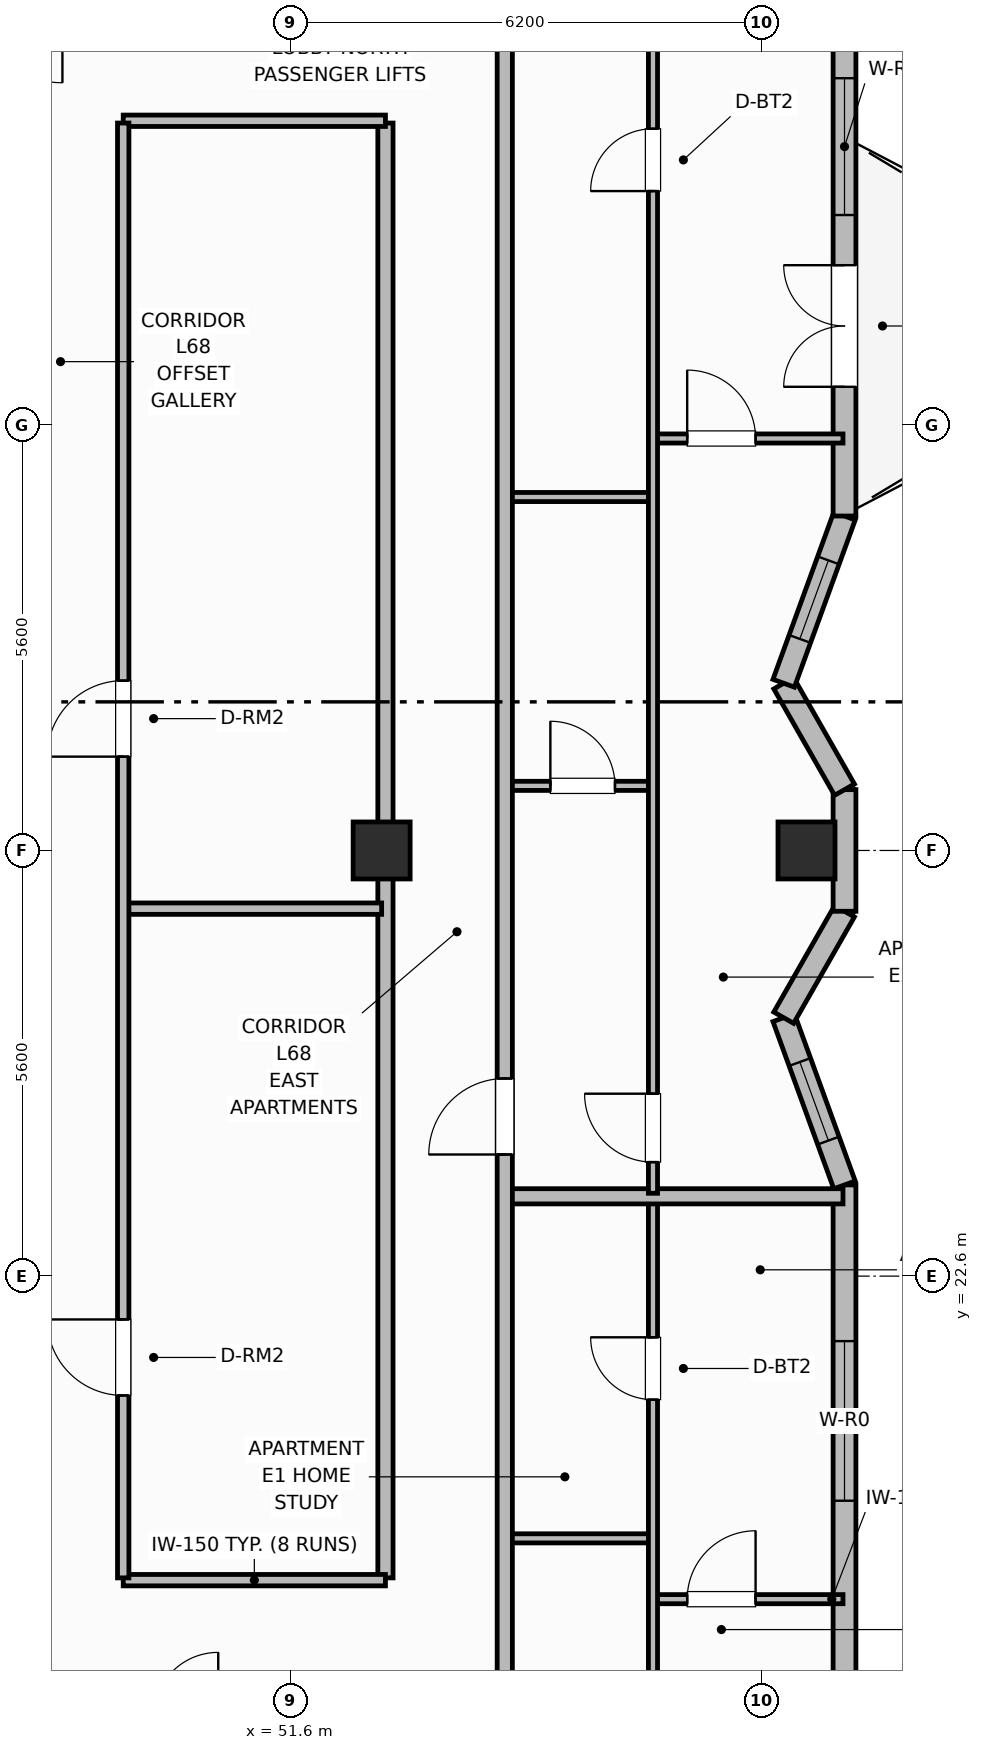
"""IFC4 building model, lengths in metres.
Left out: names, types, materials, properties, quantities, classifications, styles, units other than length and angle.
Written with IfcOpenShell. Run it as: python <this file> out.ifc"""

import sys

from ifc_helpers import new_model, si_unit, direction, frame, frame_2d, origin, origin_2d, place, context, subcontext, project, spatial, rectangle, extrude, element, fill, save


model = new_model("IFC4")
c1 = context("Model", 3, precision=1e-05, world=origin(), true_north=direction((0.0, 1.0)))
c2 = subcontext(c1, "Body", "Model", "MODEL_VIEW")
j1 = project(units=[si_unit("LENGTHUNIT", "METRE"), si_unit("PLANEANGLEUNIT", "RADIAN")], contexts=[c1])
p1 = place(None, origin())
s1 = spatial("IfcSite", under=j1, at=p1, CompositionType="ELEMENT")
p2 = place(p1, origin())
s2 = spatial("IfcBuilding", under=s1, at=p2, CompositionType="ELEMENT")
p3 = place(p2, frame((0.0, 0.0, 271.3)))
s3 = spatial("IfcBuildingStorey", under=s2, at=p3, CompositionType="ELEMENT", Elevation=271.3)
for number, where, z_axis, x_axis in (
    (1, (52.8, 28.2, 0.0), (0.0, 0.0, 1.0), (1.0, 0.0, 0.0)),
    (2, (58.39, 28.2, 0.0), (0.0, 0.0, 1.0), (1.0, 0.0, 0.0)),
):
    element("IfcColumn", number, at=place(p3, frame(where, z_axis=z_axis, x_axis=x_axis)), inside=s3, PredefinedType="COLUMN", context=c2, shape_type="SweptSolid", body=[
        extrude(rectangle(XDim=0.75, YDim=0.75, at=origin_2d()), origin(), (0.0, 0.0, 1.0), 3.7),
    ])
p4 = place(p3, frame((58.89, 12.68, 0.0), z_axis=(0.0, 0.0, 1.0), x_axis=(0.0, 1.0, 0.0)))
e3 = element("IfcWall", 3, at=p4, inside=s3, PredefinedType="SOLIDWALL", context=c2, shape_type="SweptSolid", body=[
    extrude(rectangle(XDim=11.12, YDim=0.3, at=frame_2d((5.56, 0.0))), origin(), (0.0, 0.0, 1.0), 2.73),
])
p5 = place(p4, frame((6.965, 0.0, 0.71)))
e4 = element("IfcOpeningElement", 4, at=p5, cuts=e3, PredefinedType="OPENING", context=c2, shape_type="SweptSolid", body=[
    extrude(rectangle(XDim=2.1, YDim=1.9, at=frame_2d((1.05, 0.95))), frame((0.0, 0.16, 0.0), z_axis=(0.0, -1.0, 0.0), x_axis=(1.0, 0.0, 0.0)), (0.0, 0.0, 1.0), 0.32),
])
p6 = place(p3, frame((58.89, 23.8, 0.0), z_axis=(0.0, 0.0, 1.0), x_axis=(-0.341676068702, 0.939817782379, 0.0)))
e5 = element("IfcWall", 5, at=p6, inside=s3, PredefinedType="SOLIDWALL", context=c2, shape_type="SweptSolid", body=[
    extrude(rectangle(XDim=2.341, YDim=0.3, at=frame_2d((1.17, 0.0))), origin(), (0.0, 0.0, 1.0), 2.73),
])
p7 = place(p6, frame((0.621, 0.0, 0.92)))
e6 = element("IfcOpeningElement", 6, at=p7, cuts=e5, PredefinedType="OPENING", context=c2, shape_type="SweptSolid", body=[
    extrude(rectangle(XDim=1.1, YDim=1.65, at=frame_2d((0.55, 0.825))), frame((0.0, 0.16, 0.0), z_axis=(0.0, -1.0, 0.0), x_axis=(1.0, 0.0, 0.0)), (0.0, 0.0, 1.0), 0.32),
])
p8 = place(p3, frame((58.09, 26.0, 0.0), z_axis=(0.0, 0.0, 1.0), x_axis=(0.496073707015, 0.868280413927, 0.0)))
e7 = element("IfcWall", 7, at=p8, inside=s3, PredefinedType="SOLIDWALL", context=c2, shape_type="SweptSolid", body=[
    extrude(rectangle(XDim=1.612, YDim=0.3, at=frame_2d((0.806, 0.0))), origin(), (0.0, 0.0, 1.0), 2.73),
])
p9 = place(p3, frame((58.89, 27.4, 0.0), z_axis=(0.0, 0.0, 1.0), x_axis=(0.0, 1.0, 0.0)))
e8 = element("IfcWall", 8, at=p9, inside=s3, PredefinedType="SOLIDWALL", context=c2, shape_type="SweptSolid", body=[
    extrude(rectangle(XDim=1.6, YDim=0.3, at=frame_2d((0.8, 0.0))), origin(), (0.0, 0.0, 1.0), 2.73),
])
p10 = place(p3, frame((58.89, 29.0, 0.0), z_axis=(0.0, 0.0, 1.0), x_axis=(-0.496073707015, 0.868280413927, 0.0)))
e9 = element("IfcWall", 9, at=p10, inside=s3, PredefinedType="SOLIDWALL", context=c2, shape_type="SweptSolid", body=[
    extrude(rectangle(XDim=1.612, YDim=0.3, at=frame_2d((0.806, 0.0))), origin(), (0.0, 0.0, 1.0), 2.73),
])
p11 = place(p3, frame((58.09, 30.4, 0.0), z_axis=(0.0, 0.0, 1.0), x_axis=(0.341642580708, 0.939829956453, 0.0)))
e10 = element("IfcWall", 10, at=p11, inside=s3, PredefinedType="SOLIDWALL", context=c2, shape_type="SweptSolid", body=[
    extrude(rectangle(XDim=2.341, YDim=0.3, at=frame_2d((1.17, 0.0))), origin(), (0.0, 0.0, 1.0), 2.73),
])
p12 = place(p11, frame((0.621, 0.0, 0.92)))
e11 = element("IfcOpeningElement", 11, at=p12, cuts=e10, PredefinedType="OPENING", context=c2, shape_type="SweptSolid", body=[
    extrude(rectangle(XDim=1.1, YDim=1.65, at=frame_2d((0.55, 0.825))), frame((0.0, 0.16, 0.0), z_axis=(0.0, -1.0, 0.0), x_axis=(1.0, 0.0, 0.0)), (0.0, 0.0, 1.0), 0.32),
])
p13 = place(p3, frame((58.89, 32.6, 0.0), z_axis=(0.0, 0.0, 1.0), x_axis=(0.0, 1.0, 0.0)))
e12 = element("IfcWall", 12, at=p13, inside=s3, PredefinedType="SOLIDWALL", context=c2, shape_type="SweptSolid", body=[
    extrude(rectangle(XDim=11.12, YDim=0.3, at=frame_2d((5.56, 0.0))), origin(), (0.0, 0.0, 1.0), 2.73),
])
p14 = place(p13, frame((1.7, 0.0, 0.0)))
e13 = element("IfcOpeningElement", 13, at=p14, cuts=e12, PredefinedType="OPENING", context=c2, shape_type="SweptSolid", body=[
    extrude(rectangle(XDim=1.6, YDim=2.1, at=frame_2d((0.8, 1.05))), frame((0.0, 0.16, 0.0), z_axis=(0.0, -1.0, 0.0), x_axis=(1.0, 0.0, 0.0)), (0.0, 0.0, 1.0), 0.32),
])
p15 = place(p13, frame((3.96, 0.0, 0.76)))
e14 = element("IfcOpeningElement", 14, at=p15, cuts=e12, PredefinedType="OPENING", context=c2, shape_type="SweptSolid", body=[
    extrude(rectangle(XDim=1.8, YDim=1.85, at=frame_2d((0.9, 0.925))), frame((0.0, 0.16, 0.0), z_axis=(0.0, -1.0, 0.0), x_axis=(1.0, 0.0, 0.0)), (0.0, 0.0, 1.0), 0.32),
])
p16 = place(p13, frame((8.283, 0.0, 0.76)))
e15 = element("IfcOpeningElement", 15, at=p16, cuts=e12, PredefinedType="OPENING", context=c2, shape_type="SweptSolid", body=[
    extrude(rectangle(XDim=1.8, YDim=1.85, at=frame_2d((0.9, 0.925))), frame((0.0, 0.16, 0.0), z_axis=(0.0, -1.0, 0.0), x_axis=(1.0, 0.0, 0.0)), (0.0, 0.0, 1.0), 0.32),
])
p17 = place(p3, frame((52.85, 18.63, 0.0), z_axis=(0.0, 0.0, 1.0), x_axis=(0.0, 1.0, 0.0)))
e16 = element("IfcWall", 16, at=p17, inside=s3, PredefinedType="PARTITIONING", context=c2, shape_type="SweptSolid", body=[
    extrude(rectangle(XDim=19.14, YDim=0.2, at=frame_2d((9.57, 0.0))), origin(), (0.0, 0.0, 1.0), 2.56),
])
for number, where, z_axis, x_axis in (
    (17, (49.4, 18.6, 0.0), (0.0, 0.0, 1.0), (1.0, 0.0, 0.0)),
    (18, (49.4, 37.8, 0.0), (0.0, 0.0, 1.0), (1.0, 0.0, 0.0)),
):
    element("IfcWall", number, at=place(p3, frame(where, z_axis=z_axis, x_axis=x_axis)), inside=s3, PredefinedType="PARTITIONING", context=c2, shape_type="SweptSolid", body=[
        extrude(rectangle(XDim=3.45, YDim=0.15, at=frame_2d((1.725, 0.0))), origin(), (0.0, 0.0, 1.0), 2.56),
    ])
p18 = place(p3, frame((49.43, 27.434, 0.0), z_axis=(0.0, 0.0, 1.0), x_axis=(1.0, 0.0, 0.0)))
e19 = element("IfcWall", 19, at=p18, inside=s3, PredefinedType="PARTITIONING", context=c2, shape_type="SweptSolid", body=[
    extrude(rectangle(XDim=3.37, YDim=0.15, at=frame_2d((1.685, 0.0))), origin(), (0.0, 0.0, 1.0), 2.56),
])
p19 = place(p3, frame((49.4, 18.63, 0.0), z_axis=(0.0, 0.0, 1.0), x_axis=(0.0, 1.0, 0.0)))
e20 = element("IfcWall", 20, at=p19, inside=s3, PredefinedType="PARTITIONING", context=c2, shape_type="SweptSolid", body=[
    extrude(rectangle(XDim=19.14, YDim=0.15, at=frame_2d((9.57, 0.0))), origin(), (0.0, 0.0, 1.0), 2.56),
])
p20 = place(p19, frame((2.4, 0.0, 0.0)))
e21 = element("IfcOpeningElement", 21, at=p20, cuts=e20, PredefinedType="OPENING", context=c2, shape_type="SweptSolid", body=[
    extrude(rectangle(XDim=1.0, YDim=2.15, at=frame_2d((0.5, 1.075))), frame((0.0, 0.085, 0.0), z_axis=(0.0, -1.0, 0.0), x_axis=(1.0, 0.0, 0.0)), (0.0, 0.0, 1.0), 0.17),
])
p21 = place(p19, frame((10.804, 0.0, 0.0)))
e22 = element("IfcOpeningElement", 22, at=p21, cuts=e20, PredefinedType="OPENING", context=c2, shape_type="SweptSolid", body=[
    extrude(rectangle(XDim=1.0, YDim=2.15, at=frame_2d((0.5, 1.075))), frame((0.0, 0.085, 0.0), z_axis=(0.0, -1.0, 0.0), x_axis=(1.0, 0.0, 0.0)), (0.0, 0.0, 1.0), 0.17),
])
p22 = place(p3, frame((54.42, 19.15, 0.0), z_axis=(0.0, 0.0, 1.0), x_axis=(1.0, 0.0, 0.0)))
e23 = element("IfcWall", 23, at=p22, inside=s3, PredefinedType="PARTITIONING", context=c2, shape_type="SweptSolid", body=[
    extrude(rectangle(XDim=1.95, YDim=0.12, at=frame_2d((0.975, 0.0))), origin(), (0.0, 0.0, 1.0), 2.56),
])
p23 = place(p3, frame((56.37, 18.35, 0.0), z_axis=(0.0, 0.0, 1.0), x_axis=(1.0, 0.0, 0.0)))
e24 = element("IfcWall", 24, at=p23, inside=s3, PredefinedType="PARTITIONING", context=c2, shape_type="SweptSolid", body=[
    extrude(rectangle(XDim=2.5, YDim=0.12, at=frame_2d((1.25, 0.0))), origin(), (0.0, 0.0, 1.0), 2.56),
])
p24 = place(p23, frame((0.45, 0.0, 0.0)))
e25 = element("IfcOpeningElement", 25, at=p24, cuts=e24, PredefinedType="OPENING", context=c2, shape_type="SweptSolid", body=[
    extrude(rectangle(XDim=0.9, YDim=2.1, at=frame_2d((0.45, 1.05))), frame((0.0, 0.07, 0.0), z_axis=(0.0, -1.0, 0.0), x_axis=(1.0, 0.0, 0.0)), (0.0, 0.0, 1.0), 0.14),
])
p25 = place(p3, frame((56.37, 9.99, 0.0), z_axis=(0.0, 0.0, 1.0), x_axis=(0.0, 1.0, 0.0)))
e26 = element("IfcWall", 26, at=p25, inside=s3, PredefinedType="PARTITIONING", context=c2, shape_type="SweptSolid", body=[
    extrude(rectangle(XDim=13.62, YDim=0.12, at=frame_2d((6.81, 0.0))), origin(), (0.0, 0.0, 1.0), 2.56),
])
p26 = place(p25, frame((0.41, 0.0, 0.0)))
e27 = element("IfcOpeningElement", 27, at=p26, cuts=e26, PredefinedType="OPENING", context=c2, shape_type="SweptSolid", body=[
    extrude(rectangle(XDim=0.9, YDim=2.1, at=frame_2d((0.45, 1.05))), frame((0.0, 0.07, 0.0), z_axis=(0.0, -1.0, 0.0), x_axis=(1.0, 0.0, 0.0)), (0.0, 0.0, 1.0), 0.14),
])
p27 = place(p25, frame((10.985, 0.0, 0.0)))
e28 = element("IfcOpeningElement", 28, at=p27, cuts=e26, PredefinedType="OPENING", context=c2, shape_type="SweptSolid", body=[
    extrude(rectangle(XDim=0.82, YDim=2.08, at=frame_2d((0.41, 1.04))), frame((0.0, 0.07, 0.0), z_axis=(0.0, -1.0, 0.0), x_axis=(1.0, 0.0, 0.0)), (0.0, 0.0, 1.0), 0.14),
])
p28 = place(p3, frame((54.42, 23.65, 0.0), z_axis=(0.0, 0.0, 1.0), x_axis=(1.0, 0.0, 0.0)))
e29 = element("IfcWall", 29, at=p28, inside=s3, PredefinedType="PARTITIONING", context=c2, shape_type="SweptSolid", body=[
    extrude(rectangle(XDim=4.45, YDim=0.2, at=frame_2d((2.225, 0.0))), origin(), (0.0, 0.0, 1.0), 2.56),
])
p29 = place(p3, frame((54.42, 29.05, 0.0), z_axis=(0.0, 0.0, 1.0), x_axis=(1.0, 0.0, 0.0)))
e30 = element("IfcWall", 30, at=p29, inside=s3, PredefinedType="PARTITIONING", context=c2, shape_type="SweptSolid", body=[
    extrude(rectangle(XDim=1.95, YDim=0.12, at=frame_2d((0.975, 0.0))), origin(), (0.0, 0.0, 1.0), 2.56),
])
p30 = place(p29, frame((0.6, 0.0, 0.0)))
e31 = element("IfcOpeningElement", 31, at=p30, cuts=e30, PredefinedType="OPENING", context=c2, shape_type="SweptSolid", body=[
    extrude(rectangle(XDim=0.85, YDim=2.1, at=frame_2d((0.425, 1.05))), frame((0.0, 0.07, 0.0), z_axis=(0.0, -1.0, 0.0), x_axis=(1.0, 0.0, 0.0)), (0.0, 0.0, 1.0), 0.14),
])
p31 = place(p3, frame((54.42, 32.85, 0.0), z_axis=(0.0, 0.0, 1.0), x_axis=(1.0, 0.0, 0.0)))
e32 = element("IfcWall", 32, at=p31, inside=s3, PredefinedType="PARTITIONING", context=c2, shape_type="SweptSolid", body=[
    extrude(rectangle(XDim=1.95, YDim=0.12, at=frame_2d((0.975, 0.0))), origin(), (0.0, 0.0, 1.0), 2.56),
])
p32 = place(p3, frame((56.37, 33.62, 0.0), z_axis=(0.0, 0.0, 1.0), x_axis=(1.0, 0.0, 0.0)))
e33 = element("IfcWall", 33, at=p32, inside=s3, PredefinedType="PARTITIONING", context=c2, shape_type="SweptSolid", body=[
    extrude(rectangle(XDim=2.5, YDim=0.12, at=frame_2d((1.25, 0.0))), origin(), (0.0, 0.0, 1.0), 2.56),
])
p33 = place(p32, frame((0.45, 0.0, 0.0)))
e34 = element("IfcOpeningElement", 34, at=p33, cuts=e33, PredefinedType="OPENING", context=c2, shape_type="SweptSolid", body=[
    extrude(rectangle(XDim=0.9, YDim=2.1, at=frame_2d((0.45, 1.05))), frame((0.0, 0.07, 0.0), z_axis=(0.0, -1.0, 0.0), x_axis=(1.0, 0.0, 0.0)), (0.0, 0.0, 1.0), 0.14),
])
p34 = place(p3, frame((56.37, 23.69, 0.0), z_axis=(0.0, 0.0, 1.0), x_axis=(0.0, 1.0, 0.0)))
e35 = element("IfcWall", 35, at=p34, inside=s3, PredefinedType="PARTITIONING", context=c2, shape_type="SweptSolid", body=[
    extrude(rectangle(XDim=22.72, YDim=0.12, at=frame_2d((11.36, 0.0))), origin(), (0.0, 0.0, 1.0), 2.56),
])
p35 = place(p34, frame((0.41, 0.0, 0.0)))
e36 = element("IfcOpeningElement", 36, at=p35, cuts=e35, PredefinedType="OPENING", context=c2, shape_type="SweptSolid", body=[
    extrude(rectangle(XDim=0.9, YDim=2.1, at=frame_2d((0.45, 1.05))), frame((0.0, 0.07, 0.0), z_axis=(0.0, -1.0, 0.0), x_axis=(1.0, 0.0, 0.0)), (0.0, 0.0, 1.0), 0.14),
])
p36 = place(p34, frame((13.185, 0.0, 0.0)))
e37 = element("IfcOpeningElement", 37, at=p36, cuts=e35, PredefinedType="OPENING", context=c2, shape_type="SweptSolid", body=[
    extrude(rectangle(XDim=0.82, YDim=2.08, at=frame_2d((0.41, 1.04))), frame((0.0, 0.07, 0.0), z_axis=(0.0, -1.0, 0.0), x_axis=(1.0, 0.0, 0.0)), (0.0, 0.0, 1.0), 0.14),
])
p37 = place(p3, frame((54.42, 9.95, 0.0), z_axis=(0.0, 0.0, 1.0), x_axis=(0.0, 1.0, 0.0)))
e38 = element("IfcWall", 38, at=p37, inside=s3, PredefinedType="PARTITIONING", context=c2, shape_type="SweptSolid", body=[
    extrude(rectangle(XDim=36.5, YDim=0.2, at=frame_2d((18.25, 0.0))), origin(), (0.0, 0.0, 1.0), 2.56),
])
p38 = place(p37, frame((3.25, 0.0, 0.0)))
e39 = element("IfcOpeningElement", 39, at=p38, cuts=e38, PredefinedType="OPENING", context=c2, shape_type="SweptSolid", body=[
    extrude(rectangle(XDim=1.0, YDim=2.15, at=frame_2d((0.5, 1.075))), frame((0.0, 0.11, 0.0), z_axis=(0.0, -1.0, 0.0), x_axis=(1.0, 0.0, 0.0)), (0.0, 0.0, 1.0), 0.22),
])
p39 = place(p37, frame((14.25, 0.0, 0.0)))
e40 = element("IfcOpeningElement", 40, at=p39, cuts=e38, PredefinedType="OPENING", context=c2, shape_type="SweptSolid", body=[
    extrude(rectangle(XDim=1.0, YDim=2.15, at=frame_2d((0.5, 1.075))), frame((0.0, 0.11, 0.0), z_axis=(0.0, -1.0, 0.0), x_axis=(1.0, 0.0, 0.0)), (0.0, 0.0, 1.0), 0.22),
])
p40 = place(p5, origin())
e41 = element("IfcWindow", 41, at=p40, inside=s3, PartitioningType="SINGLE_PANEL", PredefinedType="WINDOW", context=c2, shape_type="SweptSolid", body=[
    extrude(rectangle(XDim=2.1, YDim=1.9, at=frame_2d((1.05, 0.95))), frame((0.0, 0.03, 0.0), z_axis=(0.0, -1.0, 0.0), x_axis=(1.0, 0.0, 0.0)), (0.0, 0.0, 1.0), 0.06),
])
fill(e4, e41)
p41 = place(p7, origin())
e42 = element("IfcWindow", 42, at=p41, inside=s3, PartitioningType="SINGLE_PANEL", PredefinedType="WINDOW", context=c2, shape_type="SweptSolid", body=[
    extrude(rectangle(XDim=1.1, YDim=1.65, at=frame_2d((0.55, 0.825))), frame((0.0, 0.03, 0.0), z_axis=(0.0, -1.0, 0.0), x_axis=(1.0, 0.0, 0.0)), (0.0, 0.0, 1.0), 0.06),
])
fill(e6, e42)
p42 = place(p12, origin())
e43 = element("IfcWindow", 43, at=p42, inside=s3, PartitioningType="SINGLE_PANEL", PredefinedType="WINDOW", context=c2, shape_type="SweptSolid", body=[
    extrude(rectangle(XDim=1.1, YDim=1.65, at=frame_2d((0.55, 0.825))), frame((0.0, 0.03, 0.0), z_axis=(0.0, -1.0, 0.0), x_axis=(1.0, 0.0, 0.0)), (0.0, 0.0, 1.0), 0.06),
])
fill(e11, e43)
p43 = place(p14, origin())
e44 = element("IfcDoor", 44, at=p43, inside=s3, OperationType="DOUBLE_DOOR_SINGLE_SWING", PredefinedType="DOOR", context=c2, shape_type="SweptSolid", body=[
    extrude(rectangle(XDim=1.6, YDim=2.1, at=frame_2d((0.8, 1.05))), frame((0.0, 0.025, 0.0), z_axis=(0.0, -1.0, 0.0), x_axis=(1.0, 0.0, 0.0)), (0.0, 0.0, 1.0), 0.05),
])
fill(e13, e44)
p44 = place(p15, origin())
e45 = element("IfcWindow", 45, at=p44, inside=s3, PartitioningType="SINGLE_PANEL", PredefinedType="WINDOW", context=c2, shape_type="SweptSolid", body=[
    extrude(rectangle(XDim=1.8, YDim=1.85, at=frame_2d((0.9, 0.925))), frame((0.0, 0.03, 0.0), z_axis=(0.0, -1.0, 0.0), x_axis=(1.0, 0.0, 0.0)), (0.0, 0.0, 1.0), 0.06),
])
fill(e14, e45)
p45 = place(p20, origin())
e46 = element("IfcDoor", 46, at=p45, inside=s3, OperationType="SINGLE_SWING_RIGHT", PredefinedType="DOOR", context=c2, shape_type="SweptSolid", body=[
    extrude(rectangle(XDim=1.0, YDim=2.15, at=frame_2d((0.5, 1.075))), frame((0.0, 0.025, 0.0), z_axis=(0.0, -1.0, 0.0), x_axis=(1.0, 0.0, 0.0)), (0.0, 0.0, 1.0), 0.05),
])
fill(e21, e46)
p46 = place(p21, origin())
e47 = element("IfcDoor", 47, at=p46, inside=s3, OperationType="SINGLE_SWING_LEFT", PredefinedType="DOOR", context=c2, shape_type="SweptSolid", body=[
    extrude(rectangle(XDim=1.0, YDim=2.15, at=frame_2d((0.5, 1.075))), frame((0.0, 0.025, 0.0), z_axis=(0.0, -1.0, 0.0), x_axis=(1.0, 0.0, 0.0)), (0.0, 0.0, 1.0), 0.05),
])
fill(e22, e47)
p47 = place(p24, origin())
e48 = element("IfcDoor", 48, at=p47, inside=s3, OperationType="SINGLE_SWING_RIGHT", PredefinedType="DOOR", context=c2, shape_type="SweptSolid", body=[
    extrude(rectangle(XDim=0.9, YDim=2.1, at=frame_2d((0.45, 1.05))), frame((0.0, 0.025, 0.0), z_axis=(0.0, -1.0, 0.0), x_axis=(1.0, 0.0, 0.0)), (0.0, 0.0, 1.0), 0.05),
])
fill(e25, e48)
p48 = place(p27, origin())
e49 = element("IfcDoor", 49, at=p48, inside=s3, OperationType="SINGLE_SWING_RIGHT", PredefinedType="DOOR", context=c2, shape_type="SweptSolid", body=[
    extrude(rectangle(XDim=0.82, YDim=2.08, at=frame_2d((0.41, 1.04))), frame((0.0, 0.025, 0.0), z_axis=(0.0, -1.0, 0.0), x_axis=(1.0, 0.0, 0.0)), (0.0, 0.0, 1.0), 0.05),
])
fill(e28, e49)
p49 = place(p30, origin())
e50 = element("IfcDoor", 50, at=p49, inside=s3, OperationType="SINGLE_SWING_LEFT", PredefinedType="DOOR", context=c2, shape_type="SweptSolid", body=[
    extrude(rectangle(XDim=0.85, YDim=2.1, at=frame_2d((0.425, 1.05))), frame((0.0, 0.025, 0.0), z_axis=(0.0, -1.0, 0.0), x_axis=(1.0, 0.0, 0.0)), (0.0, 0.0, 1.0), 0.05),
])
fill(e31, e50)
p50 = place(p33, origin())
e51 = element("IfcDoor", 51, at=p50, inside=s3, OperationType="SINGLE_SWING_LEFT", PredefinedType="DOOR", context=c2, shape_type="SweptSolid", body=[
    extrude(rectangle(XDim=0.9, YDim=2.1, at=frame_2d((0.45, 1.05))), frame((0.0, 0.025, 0.0), z_axis=(0.0, -1.0, 0.0), x_axis=(1.0, 0.0, 0.0)), (0.0, 0.0, 1.0), 0.05),
])
fill(e34, e51)
p51 = place(p35, origin())
e52 = element("IfcDoor", 52, at=p51, inside=s3, OperationType="SINGLE_SWING_RIGHT", PredefinedType="DOOR", context=c2, shape_type="SweptSolid", body=[
    extrude(rectangle(XDim=0.9, YDim=2.1, at=frame_2d((0.45, 1.05))), frame((0.0, 0.025, 0.0), z_axis=(0.0, -1.0, 0.0), x_axis=(1.0, 0.0, 0.0)), (0.0, 0.0, 1.0), 0.05),
])
fill(e36, e52)
p52 = place(p36, origin())
e53 = element("IfcDoor", 53, at=p52, inside=s3, OperationType="SINGLE_SWING_LEFT", PredefinedType="DOOR", context=c2, shape_type="SweptSolid", body=[
    extrude(rectangle(XDim=0.82, YDim=2.08, at=frame_2d((0.41, 1.04))), frame((0.0, 0.025, 0.0), z_axis=(0.0, -1.0, 0.0), x_axis=(1.0, 0.0, 0.0)), (0.0, 0.0, 1.0), 0.05),
])
fill(e37, e53)
p53 = place(p39, origin())
e54 = element("IfcDoor", 54, at=p53, inside=s3, OperationType="SINGLE_SWING_LEFT", PredefinedType="DOOR", context=c2, shape_type="SweptSolid", body=[
    extrude(rectangle(XDim=1.0, YDim=2.15, at=frame_2d((0.5, 1.075))), frame((0.0, 0.025, 0.0), z_axis=(0.0, -1.0, 0.0), x_axis=(1.0, 0.0, 0.0)), (0.0, 0.0, 1.0), 0.05),
])
fill(e40, e54)
save(model, sys.argv[1])
